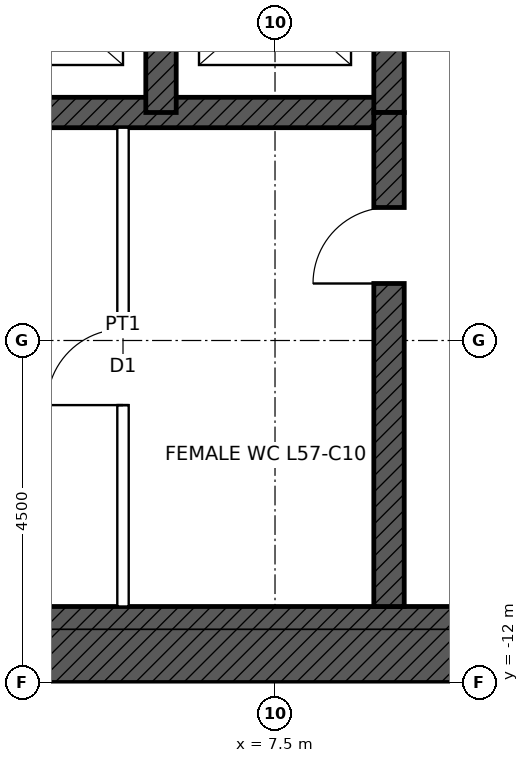
"""IFC4 building model, lengths in metres.
Left out: names, types, materials, properties, quantities, classifications, styles, units other than length and angle.
Written with IfcOpenShell. Run it as: python <this file> out.ifc"""

import sys

from ifc_helpers import new_model, si_unit, direction, frame, frame_2d, origin, place, context, subcontext, project, spatial, rectangle, extrude, element, fill, save


model = new_model("IFC4")
c1 = context("Model", 3, precision=1e-05, world=origin(), true_north=direction((0.0, 1.0)))
c2 = subcontext(c1, "Body", "Model", "MODEL_VIEW")
j1 = project(units=[si_unit("LENGTHUNIT", "METRE"), si_unit("PLANEANGLEUNIT", "RADIAN")], contexts=[c1])
p1 = place(None, origin())
s1 = spatial("IfcSite", under=j1, at=p1, CompositionType="ELEMENT")
p2 = place(p1, origin())
s2 = spatial("IfcBuilding", under=s1, at=p2, CompositionType="ELEMENT")
p3 = place(p2, frame((0.0, 0.0, 263.9)))
s3 = spatial("IfcBuildingStorey", under=s2, at=p3, CompositionType="ELEMENT", Elevation=263.9)
p4 = place(p3, frame((12.0, -11.5, 0.0), z_axis=(0.0, 0.0, 1.0), x_axis=(-1.0, 0.0, 0.0)))
e1 = element("IfcWall", 1, at=p4, inside=s3, PredefinedType="SHEAR", context=c2, shape_type="SweptSolid", body=[
    extrude(rectangle(XDim=24.0, YDim=1.0, at=frame_2d((12.0, 0.0))), origin(), (0.0, 0.0, 1.0), 4.0),
])
p5 = place(p4, frame((11.5, 0.0, 0.0)))
e2 = element("IfcOpeningElement", 2, at=p5, cuts=e1, PredefinedType="OPENING", context=c2, shape_type="SweptSolid", body=[
    extrude(rectangle(XDim=1.0, YDim=2.1, at=frame_2d((0.5, 1.05))), frame((0.0, 0.51, 0.0), z_axis=(0.0, -1.0, 0.0), x_axis=(1.0, 0.0, 0.0)), (0.0, 0.0, 1.0), 1.02),
])
p6 = place(p4, frame((1.0, 0.0, 0.0)))
e3 = element("IfcOpeningElement", 3, at=p6, cuts=e1, PredefinedType="OPENING", context=c2, shape_type="SweptSolid", body=[
    extrude(rectangle(XDim=1.0, YDim=2.4, at=frame_2d((0.5, 1.2))), frame((0.0, 0.51, 0.0), z_axis=(0.0, -1.0, 0.0), x_axis=(1.0, 0.0, 0.0)), (0.0, 0.0, 1.0), 1.02),
])
p7 = place(p3, frame((-9.0, -4.5, 0.0), z_axis=(0.0, 0.0, 1.0), x_axis=(1.0, 0.0, 0.0)))
e4 = element("IfcWall", 4, at=p7, inside=s3, PredefinedType="SHEAR", context=c2, shape_type="SweptSolid", body=[
    extrude(rectangle(XDim=18.0, YDim=0.4, at=frame_2d((9.0, 0.0))), origin(), (0.0, 0.0, 1.0), 4.0),
])
for number, where, z_axis, x_axis in (
    (5, (9.0, -4.5, 0.0), (0.0, 0.0, 1.0), (0.0, 1.0, 0.0)),
    (6, (6.0, -4.5, 0.0), (0.0, 0.0, 1.0), (0.0, 1.0, 0.0)),
):
    element("IfcWall", number, at=place(p3, frame(where, z_axis=z_axis, x_axis=x_axis)), inside=s3, PredefinedType="SHEAR", context=c2, shape_type="SweptSolid", body=[
        extrude(rectangle(XDim=3.0, YDim=0.4, at=frame_2d((1.5, 0.0))), origin(), (0.0, 0.0, 1.0), 4.0),
    ])
p8 = place(p3, frame((9.0, -11.0, 0.0), z_axis=(0.0, 0.0, 1.0), x_axis=(0.0, 1.0, 0.0)))
e7 = element("IfcWall", 7, at=p8, inside=s3, PredefinedType="SHEAR", context=c2, shape_type="SweptSolid", body=[
    extrude(rectangle(XDim=6.5, YDim=0.4, at=frame_2d((3.25, 0.0))), origin(), (0.0, 0.0, 1.0), 4.0),
])
p9 = place(p8, frame((4.25, 0.0, 0.0)))
e8 = element("IfcOpeningElement", 8, at=p9, cuts=e7, PredefinedType="OPENING", context=c2, shape_type="SweptSolid", body=[
    extrude(rectangle(XDim=1.0, YDim=2.1, at=frame_2d((0.5, 1.05))), frame((0.0, 0.21, 0.0), z_axis=(0.0, -1.0, 0.0), x_axis=(1.0, 0.0, 0.0)), (0.0, 0.0, 1.0), 0.42),
])
p10 = place(p3, frame((5.5, -11.0, 0.0), z_axis=(0.0, 0.0, 1.0), x_axis=(0.0, 1.0, 0.0)))
e9 = element("IfcWall", 9, at=p10, inside=s3, PredefinedType="PARTITIONING", context=c2, shape_type="SweptSolid", body=[
    extrude(rectangle(XDim=6.3, YDim=0.15, at=frame_2d((3.15, 0.0))), origin(), (0.0, 0.0, 1.0), 3.75),
])
p11 = place(p10, frame((2.65, 0.0, 0.0)))
e10 = element("IfcOpeningElement", 10, at=p11, cuts=e9, PredefinedType="OPENING", context=c2, shape_type="SweptSolid", body=[
    extrude(rectangle(XDim=1.0, YDim=2.1, at=frame_2d((0.5, 1.05))), frame((0.0, 0.085, 0.0), z_axis=(0.0, -1.0, 0.0), x_axis=(1.0, 0.0, 0.0)), (0.0, 0.0, 1.0), 0.17),
])
p12 = place(p9, origin())
e11 = element("IfcDoor", 11, at=p12, inside=s3, OperationType="SINGLE_SWING_LEFT", PredefinedType="DOOR", context=c2, shape_type="SweptSolid", body=[
    extrude(rectangle(XDim=1.0, YDim=2.1, at=frame_2d((0.5, 1.05))), frame((0.0, 0.025, 0.0), z_axis=(0.0, -1.0, 0.0), x_axis=(1.0, 0.0, 0.0)), (0.0, 0.0, 1.0), 0.05),
])
fill(e8, e11)
p13 = place(p11, origin())
e12 = element("IfcDoor", 12, at=p13, inside=s3, OperationType="SINGLE_SWING_LEFT", PredefinedType="DOOR", context=c2, shape_type="SweptSolid", body=[
    extrude(rectangle(XDim=1.0, YDim=2.1, at=frame_2d((0.5, 1.05))), frame((0.0, 0.025, 0.0), z_axis=(0.0, -1.0, 0.0), x_axis=(1.0, 0.0, 0.0)), (0.0, 0.0, 1.0), 0.05),
])
fill(e10, e12)
save(model, sys.argv[1])
